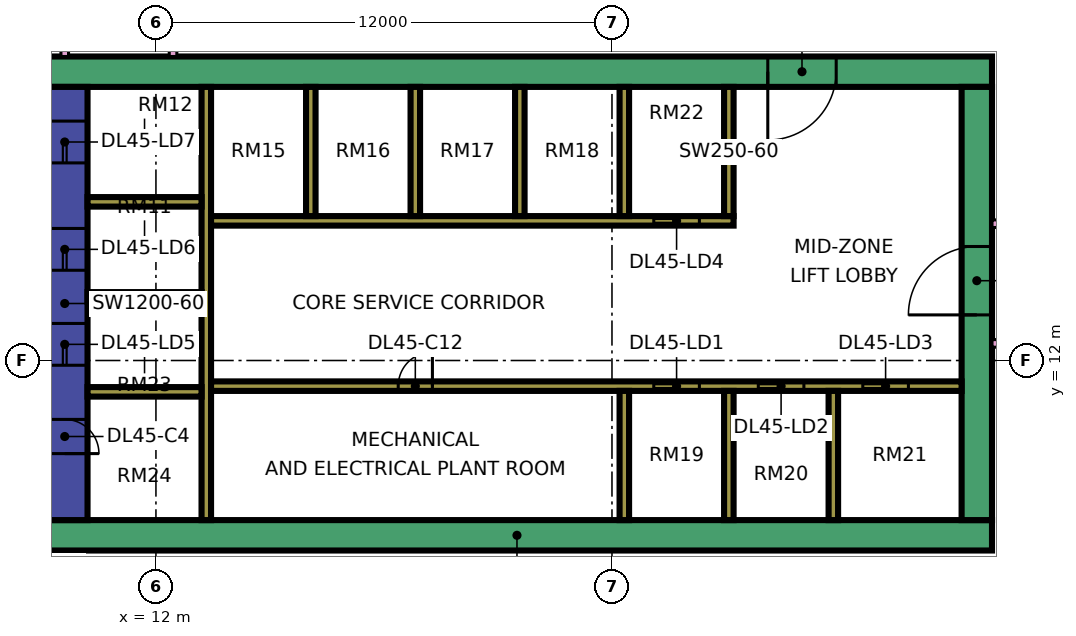
"""IFC4 building model, lengths in metres.
Left out: names, types, materials, properties, quantities, classifications, styles, units other than length and angle.
Written with IfcOpenShell. Run it as: python <this file> out.ifc"""

import sys

from ifc_helpers import new_model, si_unit, direction, frame, frame_2d, origin, place, context, subcontext, project, spatial, rectangle, extrude, element, fill, save


model = new_model("IFC4")
c1 = context("Model", 3, precision=1e-05, world=origin(), true_north=direction((0.0, 1.0)))
c2 = subcontext(c1, "Body", "Model", "MODEL_VIEW")
j1 = project(units=[si_unit("LENGTHUNIT", "METRE"), si_unit("PLANEANGLEUNIT", "RADIAN")], contexts=[c1])
p1 = place(None, origin())
s1 = spatial("IfcSite", under=j1, at=p1, CompositionType="ELEMENT")
p2 = place(p1, origin())
s2 = spatial("IfcBuilding", under=s1, at=p2, CompositionType="ELEMENT")
p3 = place(p2, frame((0.0, 0.0, 194.9)))
s3 = spatial("IfcBuildingStorey", under=s2, at=p3, CompositionType="ELEMENT", Elevation=194.9)
p4 = place(p3, frame((9.0, 7.4, 0.0), z_axis=(0.0, 0.0, 1.0), x_axis=(1.0, 0.0, 0.0)))
e1 = element("IfcWall", 1, at=p4, inside=s3, PredefinedType="SHEAR", context=c2, shape_type="SweptSolid", body=[
    extrude(rectangle(XDim=25.0, YDim=0.8, at=frame_2d((12.5, 0.0))), origin(), (0.0, 0.0, 1.0), 3.75),
])
p5 = place(p3, frame((9.0, 19.6, 0.0), z_axis=(0.0, 0.0, 1.0), x_axis=(1.0, 0.0, 0.0)))
e2 = element("IfcWall", 2, at=p5, inside=s3, PredefinedType="SHEAR", context=c2, shape_type="SweptSolid", body=[
    extrude(rectangle(XDim=25.0, YDim=0.8, at=frame_2d((12.5, 0.0))), origin(), (0.0, 0.0, 1.0), 3.75),
])
p6 = place(p5, frame((19.1, 0.0, 0.0)))
e3 = element("IfcOpeningElement", 3, at=p6, cuts=e2, PredefinedType="OPENING", context=c2, shape_type="SweptSolid", body=[
    extrude(rectangle(XDim=1.8, YDim=2.4, at=frame_2d((0.9, 1.2))), frame((0.0, 0.41, 0.0), z_axis=(0.0, -1.0, 0.0), x_axis=(1.0, 0.0, 0.0)), (0.0, 0.0, 1.0), 0.82),
])
p7 = place(p3, frame((9.6, 7.8, 0.0), z_axis=(0.0, 0.0, 1.0), x_axis=(0.0, 1.0, 0.0)))
e4 = element("IfcWall", 4, at=p7, inside=s3, PredefinedType="SHEAR", context=c2, shape_type="SweptSolid", body=[
    extrude(rectangle(XDim=11.4, YDim=1.2, at=frame_2d((5.7, 0.0))), origin(), (0.0, 0.0, 1.0), 3.75),
])
p8 = place(p7, frame((4.075, 0.0, 0.0)))
e5 = element("IfcOpeningElement", 5, at=p8, cuts=e4, PredefinedType="OPENING", context=c2, shape_type="SweptSolid", body=[
    extrude(rectangle(XDim=1.1, YDim=2.2, at=frame_2d((0.55, 1.1))), frame((0.0, 0.61, 0.0), z_axis=(0.0, -1.0, 0.0), x_axis=(1.0, 0.0, 0.0)), (0.0, 0.0, 1.0), 1.22),
])
p9 = place(p7, frame((6.575, 0.0, 0.0)))
e6 = element("IfcOpeningElement", 6, at=p9, cuts=e4, PredefinedType="OPENING", context=c2, shape_type="SweptSolid", body=[
    extrude(rectangle(XDim=1.1, YDim=2.2, at=frame_2d((0.55, 1.1))), frame((0.0, 0.61, 0.0), z_axis=(0.0, -1.0, 0.0), x_axis=(1.0, 0.0, 0.0)), (0.0, 0.0, 1.0), 1.22),
])
p10 = place(p7, frame((9.4, 0.0, 0.0)))
e7 = element("IfcOpeningElement", 7, at=p10, cuts=e4, PredefinedType="OPENING", context=c2, shape_type="SweptSolid", body=[
    extrude(rectangle(XDim=1.1, YDim=2.2, at=frame_2d((0.55, 1.1))), frame((0.0, 0.61, 0.0), z_axis=(0.0, -1.0, 0.0), x_axis=(1.0, 0.0, 0.0)), (0.0, 0.0, 1.0), 1.22),
])
p11 = place(p7, frame((1.75, 0.0, 0.0)))
e8 = element("IfcOpeningElement", 8, at=p11, cuts=e4, PredefinedType="OPENING", context=c2, shape_type="SweptSolid", body=[
    extrude(rectangle(XDim=0.9, YDim=2.1, at=frame_2d((0.45, 1.05))), frame((0.0, 0.61, 0.0), z_axis=(0.0, -1.0, 0.0), x_axis=(1.0, 0.0, 0.0)), (0.0, 0.0, 1.0), 1.22),
])
p12 = place(p3, frame((33.6, 7.8, 0.0), z_axis=(0.0, 0.0, 1.0), x_axis=(0.0, 1.0, 0.0)))
e9 = element("IfcWall", 9, at=p12, inside=s3, PredefinedType="SHEAR", context=c2, shape_type="SweptSolid", body=[
    extrude(rectangle(XDim=11.4, YDim=0.8, at=frame_2d((5.7, 0.0))), origin(), (0.0, 0.0, 1.0), 3.75),
])
p13 = place(p12, frame((5.4, 0.0, 0.0)))
e10 = element("IfcOpeningElement", 10, at=p13, cuts=e9, PredefinedType="OPENING", context=c2, shape_type="SweptSolid", body=[
    extrude(rectangle(XDim=1.8, YDim=2.4, at=frame_2d((0.9, 1.2))), frame((0.0, 0.41, 0.0), z_axis=(0.0, -1.0, 0.0), x_axis=(1.0, 0.0, 0.0)), (0.0, 0.0, 1.0), 0.82),
])
p14 = place(p3, frame((13.325, 7.8, 0.0), z_axis=(0.0, 0.0, 1.0), x_axis=(0.0, 1.0, 0.0)))
e11 = element("IfcWall", 11, at=p14, inside=s3, PredefinedType="SHEAR", context=c2, shape_type="SweptSolid", body=[
    extrude(rectangle(XDim=11.4, YDim=0.25, at=frame_2d((5.7, 0.0))), origin(), (0.0, 0.0, 1.0), 3.75),
])
p15 = place(p3, frame((13.45, 11.325, 0.0), z_axis=(0.0, 0.0, 1.0), x_axis=(1.0, 0.0, 0.0)))
e12 = element("IfcWall", 12, at=p15, inside=s3, PredefinedType="SHEAR", context=c2, shape_type="SweptSolid", body=[
    extrude(rectangle(XDim=19.75, YDim=0.25, at=frame_2d((9.875, 0.0))), origin(), (0.0, 0.0, 1.0), 3.75),
])
p16 = place(p15, frame((11.65, 0.0, 0.0)))
e13 = element("IfcOpeningElement", 13, at=p16, cuts=e12, PredefinedType="OPENING", context=c2, shape_type="SweptSolid", body=[
    extrude(rectangle(XDim=1.2, YDim=2.2, at=frame_2d((0.6, 1.1))), frame((0.0, 0.135, 0.0), z_axis=(0.0, -1.0, 0.0), x_axis=(1.0, 0.0, 0.0)), (0.0, 0.0, 1.0), 0.27),
])
p17 = place(p15, frame((14.4, 0.0, 0.0)))
e14 = element("IfcOpeningElement", 14, at=p17, cuts=e12, PredefinedType="OPENING", context=c2, shape_type="SweptSolid", body=[
    extrude(rectangle(XDim=1.2, YDim=2.2, at=frame_2d((0.6, 1.1))), frame((0.0, 0.135, 0.0), z_axis=(0.0, -1.0, 0.0), x_axis=(1.0, 0.0, 0.0)), (0.0, 0.0, 1.0), 0.27),
])
p18 = place(p15, frame((17.15, 0.0, 0.0)))
e15 = element("IfcOpeningElement", 15, at=p18, cuts=e12, PredefinedType="OPENING", context=c2, shape_type="SweptSolid", body=[
    extrude(rectangle(XDim=1.2, YDim=2.2, at=frame_2d((0.6, 1.1))), frame((0.0, 0.135, 0.0), z_axis=(0.0, -1.0, 0.0), x_axis=(1.0, 0.0, 0.0)), (0.0, 0.0, 1.0), 0.27),
])
p19 = place(p15, frame((4.925, 0.0, 0.0)))
e16 = element("IfcOpeningElement", 16, at=p19, cuts=e12, PredefinedType="OPENING", context=c2, shape_type="SweptSolid", body=[
    extrude(rectangle(XDim=0.9, YDim=2.1, at=frame_2d((0.45, 1.05))), frame((0.0, 0.135, 0.0), z_axis=(0.0, -1.0, 0.0), x_axis=(1.0, 0.0, 0.0)), (0.0, 0.0, 1.0), 0.27),
])
p20 = place(p3, frame((13.45, 15.675, 0.0), z_axis=(0.0, 0.0, 1.0), x_axis=(1.0, 0.0, 0.0)))
e17 = element("IfcWall", 17, at=p20, inside=s3, PredefinedType="SHEAR", context=c2, shape_type="SweptSolid", body=[
    extrude(rectangle(XDim=13.75, YDim=0.25, at=frame_2d((6.875, 0.0))), origin(), (0.0, 0.0, 1.0), 3.75),
])
p21 = place(p20, frame((11.65, 0.0, 0.0)))
e18 = element("IfcOpeningElement", 18, at=p21, cuts=e17, PredefinedType="OPENING", context=c2, shape_type="SweptSolid", body=[
    extrude(rectangle(XDim=1.2, YDim=2.2, at=frame_2d((0.6, 1.1))), frame((0.0, 0.135, 0.0), z_axis=(0.0, -1.0, 0.0), x_axis=(1.0, 0.0, 0.0)), (0.0, 0.0, 1.0), 0.27),
])
for number, where, z_axis, x_axis in (
    (19, (10.2, 11.175, 0.0), (0.0, 0.0, 1.0), (1.0, 0.0, 0.0)),
    (20, (10.2, 13.675, 0.0), (0.0, 0.0, 1.0), (1.0, 0.0, 0.0)),
    (21, (10.2, 16.175, 0.0), (0.0, 0.0, 1.0), (1.0, 0.0, 0.0)),
):
    element("IfcWall", number, at=place(p3, frame(where, z_axis=z_axis, x_axis=x_axis)), inside=s3, PredefinedType="SHEAR", context=c2, shape_type="SweptSolid", body=[
        extrude(rectangle(XDim=3.0, YDim=0.25, at=frame_2d((1.5, 0.0))), origin(), (0.0, 0.0, 1.0), 3.75),
    ])
for number, where, z_axis, x_axis in (
    (22, (24.325, 7.8, 0.0), (0.0, 0.0, 1.0), (0.0, 1.0, 0.0)),
    (23, (27.075, 7.8, 0.0), (0.0, 0.0, 1.0), (0.0, 1.0, 0.0)),
    (24, (29.825, 7.8, 0.0), (0.0, 0.0, 1.0), (0.0, 1.0, 0.0)),
    (25, (16.075, 15.8, 0.0), (0.0, 0.0, 1.0), (0.0, 1.0, 0.0)),
    (26, (18.825, 15.8, 0.0), (0.0, 0.0, 1.0), (0.0, 1.0, 0.0)),
    (27, (21.575, 15.8, 0.0), (0.0, 0.0, 1.0), (0.0, 1.0, 0.0)),
    (28, (24.325, 15.8, 0.0), (0.0, 0.0, 1.0), (0.0, 1.0, 0.0)),
    (29, (27.075, 15.8, 0.0), (0.0, 0.0, 1.0), (0.0, 1.0, 0.0)),
):
    element("IfcWall", number, at=place(p3, frame(where, z_axis=z_axis, x_axis=x_axis)), inside=s3, PredefinedType="SHEAR", context=c2, shape_type="SweptSolid", body=[
        extrude(rectangle(XDim=3.4, YDim=0.25, at=frame_2d((1.7, 0.0))), origin(), (0.0, 0.0, 1.0), 3.75),
    ])
p22 = place(p3, frame((-1.447, 12.553, 0.0), z_axis=(0.0, 0.0, 1.0), x_axis=(0.707106781187, -0.707106781187, 0.0)))
e30 = element("IfcWall", 30, at=p22, inside=s3, PredefinedType="SOLIDWALL", context=c2, shape_type="SweptSolid", body=[
    extrude(rectangle(XDim=19.799, YDim=0.15, at=frame_2d((9.899, 0.0))), origin(), (0.0, 0.0, 1.0), 3.35),
])
p23 = place(p22, frame((2.212, 0.0, 0.45)))
e31 = element("IfcOpeningElement", 31, at=p23, cuts=e30, PredefinedType="OPENING", context=c2, shape_type="SweptSolid", body=[
    extrude(rectangle(XDim=3.0, YDim=2.4, at=frame_2d((1.5, 1.2))), frame((0.0, 0.085, 0.0), z_axis=(0.0, -1.0, 0.0), x_axis=(1.0, 0.0, 0.0)), (0.0, 0.0, 1.0), 0.17),
])
p24 = place(p22, frame((10.216, 0.0, 0.45)))
e32 = element("IfcOpeningElement", 32, at=p24, cuts=e30, PredefinedType="OPENING", context=c2, shape_type="SweptSolid", body=[
    extrude(rectangle(XDim=3.0, YDim=2.4, at=frame_2d((1.5, 1.2))), frame((0.0, 0.085, 0.0), z_axis=(0.0, -1.0, 0.0), x_axis=(1.0, 0.0, 0.0)), (0.0, 0.0, 1.0), 0.17),
])
p25 = place(p3, frame((9.6, 20.0, 0.0), z_axis=(0.0, 0.0, 1.0), x_axis=(0.0, 1.0, 0.0)))
e33 = element("IfcWall", 33, at=p25, inside=s3, PredefinedType="PARTITIONING", context=c2, shape_type="SweptSolid", body=[
    extrude(rectangle(XDim=44.35, YDim=0.2, at=frame_2d((22.175, 0.0))), origin(), (0.0, 0.0, 1.0), 3.35),
])
p26 = place(p25, frame((17.1, 0.0, 0.0)))
e34 = element("IfcOpeningElement", 34, at=p26, cuts=e33, PredefinedType="OPENING", context=c2, shape_type="SweptSolid", body=[
    extrude(rectangle(XDim=1.0, YDim=2.1, at=frame_2d((0.5, 1.05))), frame((0.0, 0.11, 0.0), z_axis=(0.0, -1.0, 0.0), x_axis=(1.0, 0.0, 0.0)), (0.0, 0.0, 1.0), 0.22),
])
p27 = place(p25, frame((29.1, 0.0, 0.0)))
e35 = element("IfcOpeningElement", 35, at=p27, cuts=e33, PredefinedType="OPENING", context=c2, shape_type="SweptSolid", body=[
    extrude(rectangle(XDim=1.0, YDim=2.1, at=frame_2d((0.5, 1.05))), frame((0.0, 0.11, 0.0), z_axis=(0.0, -1.0, 0.0), x_axis=(1.0, 0.0, 0.0)), (0.0, 0.0, 1.0), 0.22),
])
p28 = place(p25, frame((0.6, 0.0, 0.0)))
e36 = element("IfcOpeningElement", 36, at=p28, cuts=e33, PredefinedType="OPENING", context=c2, shape_type="SweptSolid", body=[
    extrude(rectangle(XDim=1.2, YDim=2.1, at=frame_2d((0.6, 1.05))), frame((0.0, 0.11, 0.0), z_axis=(0.0, -1.0, 0.0), x_axis=(1.0, 0.0, 0.0)), (0.0, 0.0, 1.0), 0.22),
])
p29 = place(p25, frame((4.35, 0.0, 0.0)))
e37 = element("IfcOpeningElement", 37, at=p29, cuts=e33, PredefinedType="OPENING", context=c2, shape_type="SweptSolid", body=[
    extrude(rectangle(XDim=1.0, YDim=2.1, at=frame_2d((0.5, 1.05))), frame((0.0, 0.11, 0.0), z_axis=(0.0, -1.0, 0.0), x_axis=(1.0, 0.0, 0.0)), (0.0, 0.0, 1.0), 0.22),
])
p30 = place(p3, frame((12.45, 20.0, 0.0), z_axis=(0.0, 0.0, 1.0), x_axis=(0.0, 1.0, 0.0)))
e38 = element("IfcWall", 38, at=p30, inside=s3, PredefinedType="PARTITIONING", context=c2, shape_type="SweptSolid", body=[
    extrude(rectangle(XDim=42.926, YDim=0.2, at=frame_2d((21.463, 0.0))), origin(), (0.0, 0.0, 1.0), 3.35),
])
p31 = place(p30, frame((7.15, 0.0, 0.0)))
e39 = element("IfcOpeningElement", 39, at=p31, cuts=e38, PredefinedType="OPENING", context=c2, shape_type="SweptSolid", body=[
    extrude(rectangle(XDim=1.6, YDim=2.1, at=frame_2d((0.8, 1.05))), frame((0.0, 0.11, 0.0), z_axis=(0.0, -1.0, 0.0), x_axis=(1.0, 0.0, 0.0)), (0.0, 0.0, 1.0), 0.22),
])
p32 = place(p30, frame((13.5, 0.0, 0.0)))
e40 = element("IfcOpeningElement", 40, at=p32, cuts=e38, PredefinedType="OPENING", context=c2, shape_type="SweptSolid", body=[
    extrude(rectangle(XDim=1.0, YDim=2.1, at=frame_2d((0.5, 1.05))), frame((0.0, 0.11, 0.0), z_axis=(0.0, -1.0, 0.0), x_axis=(1.0, 0.0, 0.0)), (0.0, 0.0, 1.0), 0.22),
])
p33 = place(p30, frame((17.2, 0.0, 0.0)))
e41 = element("IfcOpeningElement", 41, at=p33, cuts=e38, PredefinedType="OPENING", context=c2, shape_type="SweptSolid", body=[
    extrude(rectangle(XDim=1.0, YDim=2.1, at=frame_2d((0.5, 1.05))), frame((0.0, 0.11, 0.0), z_axis=(0.0, -1.0, 0.0), x_axis=(1.0, 0.0, 0.0)), (0.0, 0.0, 1.0), 0.22),
])
p34 = place(p30, frame((35.2, 0.0, 0.0)))
e42 = element("IfcOpeningElement", 42, at=p34, cuts=e38, PredefinedType="OPENING", context=c2, shape_type="SweptSolid", body=[
    extrude(rectangle(XDim=1.0, YDim=2.1, at=frame_2d((0.5, 1.05))), frame((0.0, 0.11, 0.0), z_axis=(0.0, -1.0, 0.0), x_axis=(1.0, 0.0, 0.0)), (0.0, 0.0, 1.0), 0.22),
])
p35 = place(p30, frame((1.15, 0.0, 0.0)))
e43 = element("IfcOpeningElement", 43, at=p35, cuts=e38, PredefinedType="OPENING", context=c2, shape_type="SweptSolid", body=[
    extrude(rectangle(XDim=1.8, YDim=2.1, at=frame_2d((0.9, 1.05))), frame((0.0, 0.11, 0.0), z_axis=(0.0, -1.0, 0.0), x_axis=(1.0, 0.0, 0.0)), (0.0, 0.0, 1.0), 0.22),
])
p36 = place(p30, frame((28.6, 0.0, 0.0)))
e44 = element("IfcOpeningElement", 44, at=p36, cuts=e38, PredefinedType="OPENING", context=c2, shape_type="SweptSolid", body=[
    extrude(rectangle(XDim=1.8, YDim=2.1, at=frame_2d((0.9, 1.05))), frame((0.0, 0.11, 0.0), z_axis=(0.0, -1.0, 0.0), x_axis=(1.0, 0.0, 0.0)), (0.0, 0.0, 1.0), 0.22),
])
p37 = place(p3, frame((34.0, 12.45, 0.0), z_axis=(0.0, 0.0, 1.0), x_axis=(1.0, 0.0, 0.0)))
e45 = element("IfcWall", 45, at=p37, inside=s3, PredefinedType="PARTITIONING", context=c2, shape_type="SweptSolid", body=[
    extrude(rectangle(XDim=2.451, YDim=0.2, at=frame_2d((1.226, 0.0))), origin(), (0.0, 0.0, 1.0), 3.35),
])
p38 = place(p3, frame((34.0, 15.6, 0.0), z_axis=(0.0, 0.0, 1.0), x_axis=(1.0, 0.0, 0.0)))
e46 = element("IfcWall", 46, at=p38, inside=s3, PredefinedType="PARTITIONING", context=c2, shape_type="SweptSolid", body=[
    extrude(rectangle(XDim=10.35, YDim=0.2, at=frame_2d((5.175, 0.0))), origin(), (0.0, 0.0, 1.0), 3.35),
])
p39 = place(p38, frame((5.6, 0.0, 0.0)))
e47 = element("IfcOpeningElement", 47, at=p39, cuts=e46, PredefinedType="OPENING", context=c2, shape_type="SweptSolid", body=[
    extrude(rectangle(XDim=1.0, YDim=2.1, at=frame_2d((0.5, 1.05))), frame((0.0, 0.11, 0.0), z_axis=(0.0, -1.0, 0.0), x_axis=(1.0, 0.0, 0.0)), (0.0, 0.0, 1.0), 0.22),
])
p40 = place(p38, frame((0.45, 0.0, 0.0)))
e48 = element("IfcOpeningElement", 48, at=p40, cuts=e46, PredefinedType="OPENING", context=c2, shape_type="SweptSolid", body=[
    extrude(rectangle(XDim=1.2, YDim=2.1, at=frame_2d((0.6, 1.05))), frame((0.0, 0.11, 0.0), z_axis=(0.0, -1.0, 0.0), x_axis=(1.0, 0.0, 0.0)), (0.0, 0.0, 1.0), 0.22),
])
p41 = place(p16, origin())
e49 = element("IfcDoor", 49, at=p41, inside=s3, OperationType="DOUBLE_DOOR_SLIDING", PredefinedType="DOOR", context=c2, shape_type="SweptSolid", body=[
    extrude(rectangle(XDim=1.2, YDim=2.2, at=frame_2d((0.6, 1.1))), frame((0.0, 0.025, 0.0), z_axis=(0.0, -1.0, 0.0), x_axis=(1.0, 0.0, 0.0)), (0.0, 0.0, 1.0), 0.05),
])
fill(e13, e49)
p42 = place(p17, origin())
e50 = element("IfcDoor", 50, at=p42, inside=s3, OperationType="DOUBLE_DOOR_SLIDING", PredefinedType="DOOR", context=c2, shape_type="SweptSolid", body=[
    extrude(rectangle(XDim=1.2, YDim=2.2, at=frame_2d((0.6, 1.1))), frame((0.0, 0.025, 0.0), z_axis=(0.0, -1.0, 0.0), x_axis=(1.0, 0.0, 0.0)), (0.0, 0.0, 1.0), 0.05),
])
fill(e14, e50)
p43 = place(p18, origin())
e51 = element("IfcDoor", 51, at=p43, inside=s3, OperationType="DOUBLE_DOOR_SLIDING", PredefinedType="DOOR", context=c2, shape_type="SweptSolid", body=[
    extrude(rectangle(XDim=1.2, YDim=2.2, at=frame_2d((0.6, 1.1))), frame((0.0, 0.025, 0.0), z_axis=(0.0, -1.0, 0.0), x_axis=(1.0, 0.0, 0.0)), (0.0, 0.0, 1.0), 0.05),
])
fill(e15, e51)
p44 = place(p21, origin())
e52 = element("IfcDoor", 52, at=p44, inside=s3, OperationType="DOUBLE_DOOR_SLIDING", PredefinedType="DOOR", context=c2, shape_type="SweptSolid", body=[
    extrude(rectangle(XDim=1.2, YDim=2.2, at=frame_2d((0.6, 1.1))), frame((0.0, 0.025, 0.0), z_axis=(0.0, -1.0, 0.0), x_axis=(1.0, 0.0, 0.0)), (0.0, 0.0, 1.0), 0.05),
])
fill(e18, e52)
p45 = place(p8, origin())
e53 = element("IfcDoor", 53, at=p45, inside=s3, OperationType="DOUBLE_DOOR_SLIDING", PredefinedType="DOOR", context=c2, shape_type="SweptSolid", body=[
    extrude(rectangle(XDim=1.1, YDim=2.2, at=frame_2d((0.55, 1.1))), frame((0.0, 0.025, 0.0), z_axis=(0.0, -1.0, 0.0), x_axis=(1.0, 0.0, 0.0)), (0.0, 0.0, 1.0), 0.05),
])
fill(e5, e53)
p46 = place(p9, origin())
e54 = element("IfcDoor", 54, at=p46, inside=s3, OperationType="DOUBLE_DOOR_SLIDING", PredefinedType="DOOR", context=c2, shape_type="SweptSolid", body=[
    extrude(rectangle(XDim=1.1, YDim=2.2, at=frame_2d((0.55, 1.1))), frame((0.0, 0.025, 0.0), z_axis=(0.0, -1.0, 0.0), x_axis=(1.0, 0.0, 0.0)), (0.0, 0.0, 1.0), 0.05),
])
fill(e6, e54)
p47 = place(p10, origin())
e55 = element("IfcDoor", 55, at=p47, inside=s3, OperationType="DOUBLE_DOOR_SLIDING", PredefinedType="DOOR", context=c2, shape_type="SweptSolid", body=[
    extrude(rectangle(XDim=1.1, YDim=2.2, at=frame_2d((0.55, 1.1))), frame((0.0, 0.025, 0.0), z_axis=(0.0, -1.0, 0.0), x_axis=(1.0, 0.0, 0.0)), (0.0, 0.0, 1.0), 0.05),
])
fill(e7, e55)
p48 = place(p13, origin())
e56 = element("IfcDoor", 56, at=p48, inside=s3, OperationType="DOUBLE_DOOR_SINGLE_SWING", PredefinedType="DOOR", context=c2, shape_type="SweptSolid", body=[
    extrude(rectangle(XDim=1.8, YDim=2.4, at=frame_2d((0.9, 1.2))), frame((0.0, 0.025, 0.0), z_axis=(0.0, -1.0, 0.0), x_axis=(1.0, 0.0, 0.0)), (0.0, 0.0, 1.0), 0.05),
])
fill(e10, e56)
p49 = place(p6, frame((1.8, 0.0, 0.0), z_axis=(0.0, 0.0, 1.0), x_axis=(-1.0, 0.0, 0.0)))
e57 = element("IfcDoor", 57, at=p49, inside=s3, OperationType="DOUBLE_DOOR_SINGLE_SWING", PredefinedType="DOOR", context=c2, shape_type="SweptSolid", body=[
    extrude(rectangle(XDim=1.8, YDim=2.4, at=frame_2d((0.9, 1.2))), frame((0.0, 0.025, 0.0), z_axis=(0.0, -1.0, 0.0), x_axis=(1.0, 0.0, 0.0)), (0.0, 0.0, 1.0), 0.05),
])
fill(e3, e57)
p50 = place(p11, frame((0.9, 0.0, 0.0), z_axis=(0.0, 0.0, 1.0), x_axis=(-1.0, 0.0, 0.0)))
e58 = element("IfcDoor", 58, at=p50, inside=s3, OperationType="SINGLE_SWING_LEFT", PredefinedType="DOOR", context=c2, shape_type="SweptSolid", body=[
    extrude(rectangle(XDim=0.9, YDim=2.1, at=frame_2d((0.45, 1.05))), frame((0.0, 0.025, 0.0), z_axis=(0.0, -1.0, 0.0), x_axis=(1.0, 0.0, 0.0)), (0.0, 0.0, 1.0), 0.05),
])
fill(e8, e58)
p51 = place(p19, frame((0.9, 0.0, 0.0), z_axis=(0.0, 0.0, 1.0), x_axis=(-1.0, 0.0, 0.0)))
e59 = element("IfcDoor", 59, at=p51, inside=s3, OperationType="SINGLE_SWING_RIGHT", PredefinedType="DOOR", context=c2, shape_type="SweptSolid", body=[
    extrude(rectangle(XDim=0.9, YDim=2.1, at=frame_2d((0.45, 1.05))), frame((0.0, 0.025, 0.0), z_axis=(0.0, -1.0, 0.0), x_axis=(1.0, 0.0, 0.0)), (0.0, 0.0, 1.0), 0.05),
])
fill(e16, e59)
save(model, sys.argv[1])
